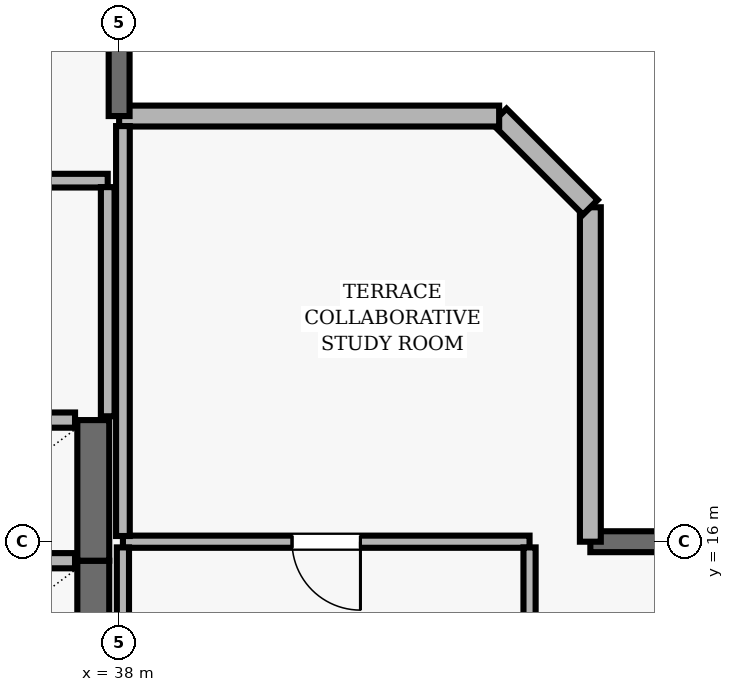
"""IFC4 building model, lengths in metres.
Left out: names, types, materials, properties, quantities, classifications, styles, units other than length and angle.
Written with IfcOpenShell. Run it as: python <this file> out.ifc"""

import sys

from ifc_helpers import new_model, si_unit, direction, frame, frame_2d, origin, place, context, subcontext, project, spatial, rectangle, extrude, element, fill, save


model = new_model("IFC4")
c1 = context("Model", 3, precision=1e-05, world=origin(), true_north=direction((0.0, 1.0)))
c2 = subcontext(c1, "Body", "Model", "MODEL_VIEW")
j1 = project(units=[si_unit("LENGTHUNIT", "METRE"), si_unit("PLANEANGLEUNIT", "RADIAN")], contexts=[c1])
p1 = place(None, origin())
s1 = spatial("IfcSite", under=j1, at=p1, CompositionType="ELEMENT")
p2 = place(p1, origin())
s2 = spatial("IfcBuilding", under=s1, at=p2, CompositionType="ELEMENT")
p3 = place(p2, frame((0.0, 0.0, 287.2)))
s3 = spatial("IfcBuildingStorey", under=s2, at=p3, CompositionType="ELEMENT", Elevation=287.2)
p4 = place(p3, frame((57.3, 16.0, 0.0), z_axis=(0.0, 0.0, 1.0), x_axis=(-1.0, 0.0, 0.0)))
e1 = element("IfcWall", 1, at=p4, inside=s3, PredefinedType="SOLIDWALL", context=c2, shape_type="SweptSolid", body=[
    extrude(rectangle(XDim=13.1, YDim=0.275, at=frame_2d((6.55, 0.0))), origin(), (0.0, 0.0, 1.0), 3.69),
])
p5 = place(p4, frame((1.15, 0.0, 0.0)))
e2 = element("IfcOpeningElement", 2, at=p5, cuts=e1, PredefinedType="OPENING", context=c2, shape_type="SweptSolid", body=[
    extrude(rectangle(XDim=1.0, YDim=2.2, at=frame_2d((0.5, 1.1))), frame((0.0, 0.147, 0.0), z_axis=(0.0, -1.0, 0.0), x_axis=(1.0, 0.0, 0.0)), (0.0, 0.0, 1.0), 0.295),
])
p6 = place(p4, frame((3.275, 0.0, 0.9)))
e3 = element("IfcOpeningElement", 3, at=p6, cuts=e1, PredefinedType="OPENING", context=c2, shape_type="SweptSolid", body=[
    extrude(rectangle(XDim=1.8, YDim=1.6, at=frame_2d((0.9, 0.8))), frame((0.0, 0.147, 0.0), z_axis=(0.0, -1.0, 0.0), x_axis=(1.0, 0.0, 0.0)), (0.0, 0.0, 1.0), 0.295),
])
p7 = place(p4, frame((8.925, 0.0, 0.9)))
e4 = element("IfcOpeningElement", 4, at=p7, cuts=e1, PredefinedType="OPENING", context=c2, shape_type="SweptSolid", body=[
    extrude(rectangle(XDim=1.8, YDim=1.6, at=frame_2d((0.9, 0.8))), frame((0.0, 0.147, 0.0), z_axis=(0.0, -1.0, 0.0), x_axis=(1.0, 0.0, 0.0)), (0.0, 0.0, 1.0), 0.295),
])
p8 = place(p3, frame((44.2, 16.0, 0.0), z_axis=(0.0, 0.0, 1.0), x_axis=(0.0, 1.0, 0.0)))
e5 = element("IfcWall", 5, at=p8, inside=s3, PredefinedType="SOLIDWALL", context=c2, shape_type="SweptSolid", body=[
    extrude(rectangle(XDim=4.4, YDim=0.275, at=frame_2d((2.2, 0.0))), origin(), (0.0, 0.0, 1.0), 3.69),
])
p9 = place(p3, frame((44.2, 20.4, 0.0), z_axis=(0.0, 0.0, 1.0), x_axis=(-0.707034851297, 0.707178703759, 0.0)))
e6 = element("IfcWall", 6, at=p9, inside=s3, PredefinedType="SOLIDWALL", context=c2, shape_type="SweptSolid", body=[
    extrude(rectangle(XDim=1.697, YDim=0.275, at=frame_2d((0.849, 0.0))), origin(), (0.0, 0.0, 1.0), 3.69),
])
p10 = place(p3, frame((43.0, 21.6, 0.0), z_axis=(0.0, 0.0, 1.0), x_axis=(-1.0, 0.0, 0.0)))
e7 = element("IfcWall", 7, at=p10, inside=s3, PredefinedType="SOLIDWALL", context=c2, shape_type="SweptSolid", body=[
    extrude(rectangle(XDim=5.0, YDim=0.275, at=frame_2d((2.5, 0.0))), origin(), (0.0, 0.0, 1.0), 3.69),
])
p11 = place(p3, frame((38.0, 21.6, 0.0), z_axis=(0.0, 0.0, 1.0), x_axis=(0.0, 1.0, 0.0)))
e8 = element("IfcWall", 8, at=p11, inside=s3, PredefinedType="SOLIDWALL", context=c2, shape_type="SweptSolid", body=[
    extrude(rectangle(XDim=13.7, YDim=0.275, at=frame_2d((6.85, 0.0))), origin(), (0.0, 0.0, 1.0), 3.69),
])
p12 = place(p11, frame((5.35, 0.0, 0.0)))
e9 = element("IfcOpeningElement", 9, at=p12, cuts=e8, PredefinedType="OPENING", context=c2, shape_type="SweptSolid", body=[
    extrude(rectangle(XDim=1.0, YDim=2.2, at=frame_2d((0.5, 1.1))), frame((0.0, 0.147, 0.0), z_axis=(0.0, -1.0, 0.0), x_axis=(1.0, 0.0, 0.0)), (0.0, 0.0, 1.0), 0.295),
])
p13 = place(p11, frame((9.375, 0.0, 0.9)))
e10 = element("IfcOpeningElement", 10, at=p13, cuts=e8, PredefinedType="OPENING", context=c2, shape_type="SweptSolid", body=[
    extrude(rectangle(XDim=1.8, YDim=1.8, at=frame_2d((0.9, 0.9))), frame((0.0, 0.147, 0.0), z_axis=(0.0, -1.0, 0.0), x_axis=(1.0, 0.0, 0.0)), (0.0, 0.0, 1.0), 0.295),
])
p14 = place(p3, frame((37.66, 13.9, 0.0), z_axis=(0.0, 0.0, 1.0), x_axis=(0.0, 1.0, 0.0)))
e11 = element("IfcWall", 11, at=p14, inside=s3, PredefinedType="SHEAR", context=c2, shape_type="SweptSolid", body=[
    extrude(rectangle(XDim=1.85, YDim=0.42, at=frame_2d((0.925, 0.0))), origin(), (0.0, 0.0, 1.0), 3.69),
])
p15 = place(p3, frame((37.42, 15.75, 0.0), z_axis=(0.0, 0.0, 1.0), x_axis=(-1.0, 0.0, 0.0)))
e12 = element("IfcWall", 12, at=p15, inside=s3, PredefinedType="SOLIDWALL", context=c2, shape_type="SweptSolid", body=[
    extrude(rectangle(XDim=2.14, YDim=0.2, at=frame_2d((1.07, 0.0))), origin(), (0.0, 0.0, 1.0), 3.69),
])
p16 = place(p3, frame((37.66, 15.75, 0.0), z_axis=(0.0, 0.0, 1.0), x_axis=(0.0, 1.0, 0.0)))
e13 = element("IfcWall", 13, at=p16, inside=s3, PredefinedType="SHEAR", context=c2, shape_type="SweptSolid", body=[
    extrude(rectangle(XDim=1.85, YDim=0.42, at=frame_2d((0.925, 0.0))), origin(), (0.0, 0.0, 1.0), 3.69),
])
p17 = place(p3, frame((37.42, 17.6, 0.0), z_axis=(0.0, 0.0, 1.0), x_axis=(-1.0, 0.0, 0.0)))
e14 = element("IfcWall", 14, at=p17, inside=s3, PredefinedType="SOLIDWALL", context=c2, shape_type="SweptSolid", body=[
    extrude(rectangle(XDim=2.14, YDim=0.2, at=frame_2d((1.07, 0.0))), origin(), (0.0, 0.0, 1.0), 3.69),
])
p18 = place(p3, frame((37.85, 20.75, 0.0), z_axis=(0.0, 0.0, 1.0), x_axis=(-1.0, 0.0, 0.0)))
e15 = element("IfcWall", 15, at=p18, inside=s3, PredefinedType="PARTITIONING", context=c2, shape_type="SweptSolid", body=[
    extrude(rectangle(XDim=4.0, YDim=0.18, at=frame_2d((2.0, 0.0))), origin(), (0.0, 0.0, 1.0), 3.69),
])
p19 = place(p3, frame((43.4, 16.0, 0.0), z_axis=(0.0, 0.0, 1.0), x_axis=(-1.0, 0.0, 0.0)))
e16 = element("IfcWall", 16, at=p19, inside=s3, PredefinedType="PARTITIONING", context=c2, shape_type="SweptSolid", body=[
    extrude(rectangle(XDim=5.35, YDim=0.16, at=frame_2d((2.675, 0.0))), origin(), (0.0, 0.0, 1.0), 3.39),
])
p20 = place(p19, frame((2.225, 0.0, 0.0)))
e17 = element("IfcOpeningElement", 17, at=p20, cuts=e16, PredefinedType="OPENING", context=c2, shape_type="SweptSolid", body=[
    extrude(rectangle(XDim=0.9, YDim=2.1, at=frame_2d((0.45, 1.05))), frame((0.0, 0.09, 0.0), z_axis=(0.0, -1.0, 0.0), x_axis=(1.0, 0.0, 0.0)), (0.0, 0.0, 1.0), 0.18),
])
p21 = place(p3, frame((37.85, 17.65, 0.0), z_axis=(0.0, 0.0, 1.0), x_axis=(0.0, 1.0, 0.0)))
e18 = element("IfcWall", 18, at=p21, inside=s3, PredefinedType="PARTITIONING", context=c2, shape_type="SweptSolid", body=[
    extrude(rectangle(XDim=3.015, YDim=0.18, at=frame_2d((1.508, 0.0))), origin(), (0.0, 0.0, 1.0), 3.221),
])
p22 = place(p3, frame((38.05, 15.925, 0.0), z_axis=(0.0, 0.0, 1.0), x_axis=(0.0, -1.0, 0.0)))
e19 = element("IfcWall", 19, at=p22, inside=s3, PredefinedType="PARTITIONING", context=c2, shape_type="SweptSolid", body=[
    extrude(rectangle(XDim=6.375, YDim=0.16, at=frame_2d((3.188, 0.0))), origin(), (0.0, 0.0, 1.0), 3.221),
])
p23 = place(p3, frame((38.05, 21.468, 0.0), z_axis=(0.0, 0.0, 1.0), x_axis=(0.0, -1.0, 0.0)))
e20 = element("IfcWall", 20, at=p23, inside=s3, PredefinedType="PARTITIONING", context=c2, shape_type="SweptSolid", body=[
    extrude(rectangle(XDim=5.393, YDim=0.18, at=frame_2d((2.697, 0.0))), origin(), (0.0, 0.0, 1.0), 3.221),
])
p24 = place(p3, frame((43.4, 10.425, 0.0), z_axis=(0.0, 0.0, 1.0), x_axis=(0.0, 1.0, 0.0)))
e21 = element("IfcWall", 21, at=p24, inside=s3, PredefinedType="PARTITIONING", context=c2, shape_type="SweptSolid", body=[
    extrude(rectangle(XDim=5.5, YDim=0.16, at=frame_2d((2.75, 0.0))), origin(), (0.0, 0.0, 1.0), 3.69),
])
p25 = place(p20, origin())
e22 = element("IfcDoor", 22, at=p25, inside=s3, OperationType="SINGLE_SWING_LEFT", PredefinedType="DOOR", context=c2, shape_type="SweptSolid", body=[
    extrude(rectangle(XDim=0.9, YDim=2.1, at=frame_2d((0.45, 1.05))), frame((0.0, 0.025, 0.0), z_axis=(0.0, -1.0, 0.0), x_axis=(1.0, 0.0, 0.0)), (0.0, 0.0, 1.0), 0.05),
])
fill(e17, e22)
save(model, sys.argv[1])
